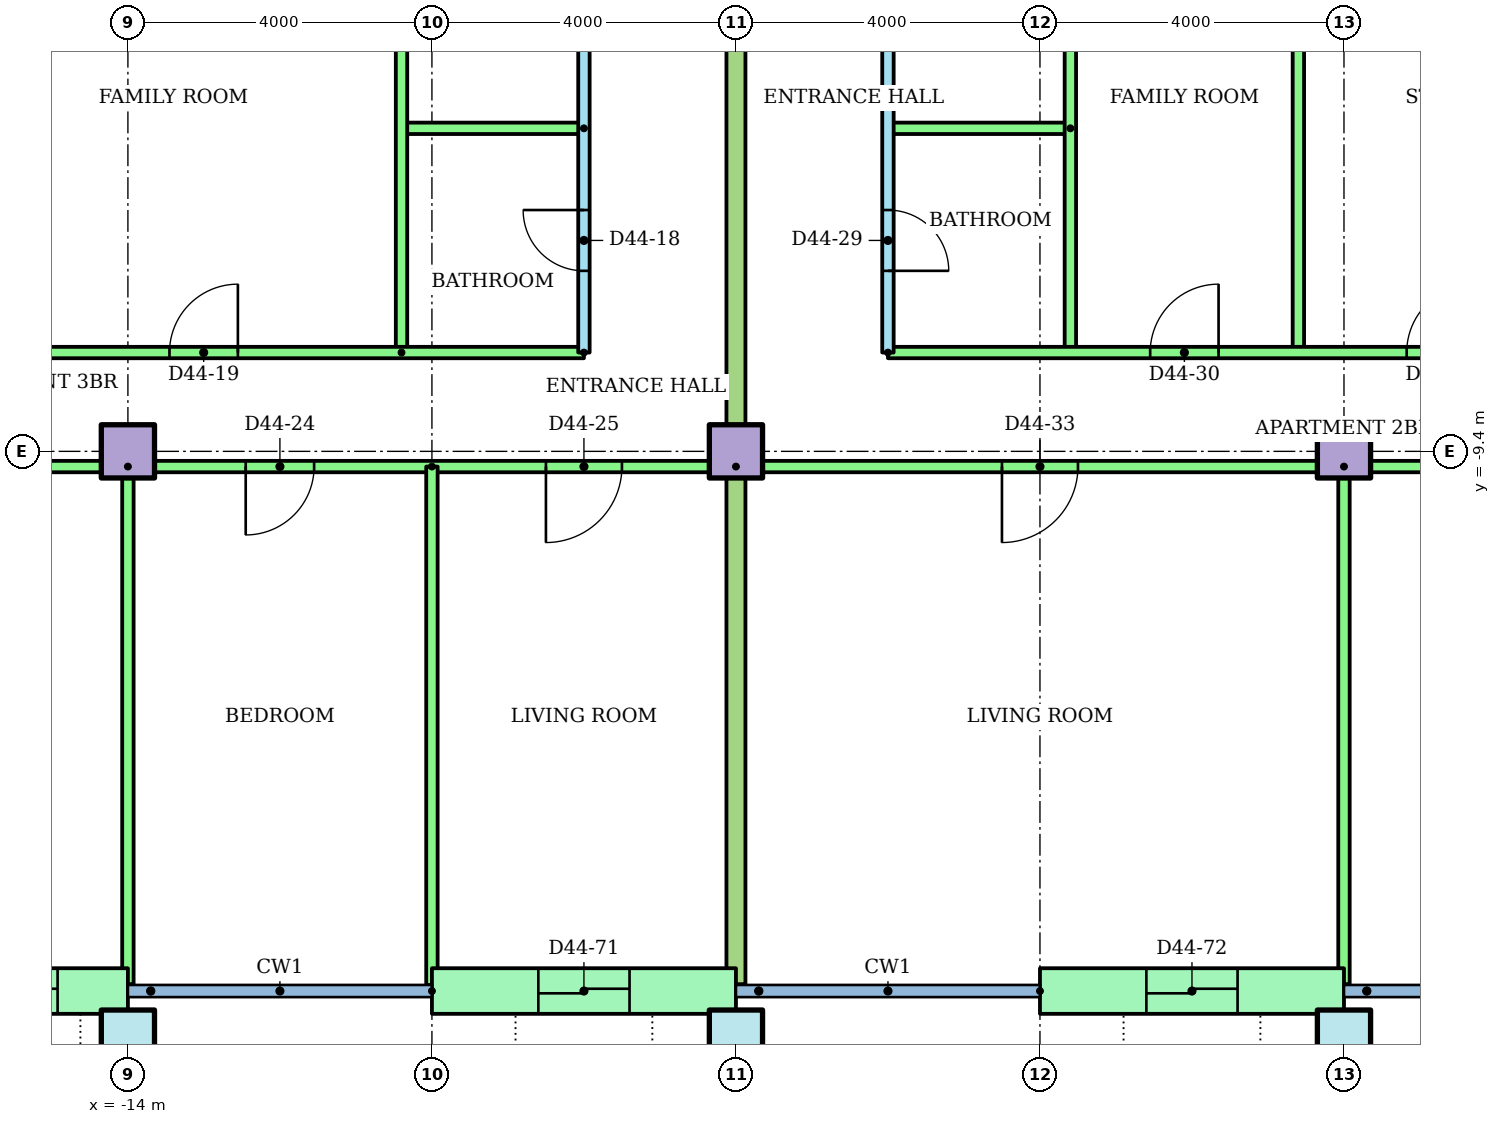
"""IFC4 building model, lengths in metres.
Left out: names, types, materials, properties, quantities, classifications, styles, units other than length and angle.
Written with IfcOpenShell. Run it as: python <this file> out.ifc"""

import sys

from ifc_helpers import new_model, si_unit, direction, frame, frame_2d, origin, origin_2d, place, context, subcontext, project, spatial, rectangle, hollow_rectangle, extrude, element, fill, save


model = new_model("IFC4")
c1 = context("Model", 3, precision=1e-05, world=origin(), true_north=direction((0.0, 1.0)))
c2 = subcontext(c1, "Body", "Model", "MODEL_VIEW")
j1 = project(units=[si_unit("LENGTHUNIT", "METRE"), si_unit("PLANEANGLEUNIT", "RADIAN")], contexts=[c1])
p1 = place(None, origin())
s1 = spatial("IfcSite", under=j1, at=p1, CompositionType="ELEMENT")
p2 = place(p1, origin())
s2 = spatial("IfcBuilding", under=s1, at=p2, CompositionType="ELEMENT")
p3 = place(p2, frame((0.0, 0.0, 171.7)))
s3 = spatial("IfcBuildingStorey", under=s2, at=p3, CompositionType="ELEMENT", Elevation=171.7)
for number, where in (
    (1, (-14.0, -17.1, 0.0)),
    (2, (-6.0, -17.1, 0.0)),
    (3, (2.0, -17.1, 0.0)),
):
    element("IfcColumn", number, at=place(p3, frame(where)), inside=s3, PredefinedType="COLUMN", context=c2, shape_type="SweptSolid", body=[
        extrude(hollow_rectangle(XDim=0.7, YDim=0.7, WallThickness=0.036, at=origin_2d()), origin(), (0.0, 0.0, 1.0), 3.2),
    ])
for number, where in (
    (4, (-14.0, -9.4, 0.0)),
    (5, (-6.0, -9.4, 0.0)),
    (6, (2.0, -9.4, 0.0)),
):
    element("IfcColumn", number, at=place(p3, frame(where)), inside=s3, PredefinedType="COLUMN", context=c2, shape_type="SweptSolid", body=[
        extrude(rectangle(XDim=0.7, YDim=0.7, at=origin_2d()), origin(), (0.0, 0.0, 1.0), 3.2),
    ])
p4 = place(p3, frame((-17.05, -16.5, 0.0)))
e7 = element("IfcWall", 7, at=p4, inside=s3, PredefinedType="STANDARD", context=c2, shape_type="SweptSolid", body=[
    extrude(rectangle(XDim=3.05, YDim=0.6, at=frame_2d((1.525, 0.0))), origin(), (0.0, 0.0, 1.0), 2.92),
])
p5 = place(p4, frame((0.925, 0.0, 0.0)))
e8 = element("IfcOpeningElement", 8, at=p5, cuts=e7, PredefinedType="OPENING", context=c2, shape_type="SweptSolid", body=[
    extrude(rectangle(XDim=1.2, YDim=2.1, at=frame_2d((0.6, 1.05))), frame((0.0, 0.31, 0.0), z_axis=(0.0, -1.0, 0.0), x_axis=(1.0, 0.0, 0.0)), (0.0, 0.0, 1.0), 0.62),
])
p6 = place(p3, frame((-10.0, -16.5, 0.0)))
e9 = element("IfcWall", 9, at=p6, inside=s3, PredefinedType="STANDARD", context=c2, shape_type="SweptSolid", body=[
    extrude(rectangle(XDim=4.0, YDim=0.6, at=frame_2d((2.0, 0.0))), origin(), (0.0, 0.0, 1.0), 2.92),
])
p7 = place(p6, frame((1.4, 0.0, 0.0)))
e10 = element("IfcOpeningElement", 10, at=p7, cuts=e9, PredefinedType="OPENING", context=c2, shape_type="SweptSolid", body=[
    extrude(rectangle(XDim=1.2, YDim=2.1, at=frame_2d((0.6, 1.05))), frame((0.0, 0.31, 0.0), z_axis=(0.0, -1.0, 0.0), x_axis=(1.0, 0.0, 0.0)), (0.0, 0.0, 1.0), 0.62),
])
p8 = place(p3, frame((-2.0, -16.5, 0.0)))
e11 = element("IfcWall", 11, at=p8, inside=s3, PredefinedType="STANDARD", context=c2, shape_type="SweptSolid", body=[
    extrude(rectangle(XDim=4.0, YDim=0.6, at=frame_2d((2.0, 0.0))), origin(), (0.0, 0.0, 1.0), 2.92),
])
p9 = place(p8, frame((1.4, 0.0, 0.0)))
e12 = element("IfcOpeningElement", 12, at=p9, cuts=e11, PredefinedType="OPENING", context=c2, shape_type="SweptSolid", body=[
    extrude(rectangle(XDim=1.2, YDim=2.1, at=frame_2d((0.6, 1.05))), frame((0.0, 0.31, 0.0), z_axis=(0.0, -1.0, 0.0), x_axis=(1.0, 0.0, 0.0)), (0.0, 0.0, 1.0), 0.62),
])
p10 = place(p3, frame((-8.0, -8.1, 0.0), z_axis=(0.0, 0.0, 1.0), x_axis=(0.0, 1.0, 0.0)))
e13 = element("IfcWall", 13, at=p10, inside=s3, PredefinedType="PARTITIONING", context=c2, shape_type="SweptSolid", body=[
    extrude(rectangle(XDim=6.7, YDim=0.15, at=frame_2d((3.35, 0.0))), origin(), (0.0, 0.0, 1.0), 2.4),
])
p11 = place(p10, frame((4.375, 0.0, 0.0)))
e14 = element("IfcOpeningElement", 14, at=p11, cuts=e13, PredefinedType="OPENING", context=c2, shape_type="SweptSolid", body=[
    extrude(rectangle(XDim=0.9, YDim=2.1, at=frame_2d((0.45, 1.05))), frame((0.0, 0.085, 0.0), z_axis=(0.0, -1.0, 0.0), x_axis=(1.0, 0.0, 0.0)), (0.0, 0.0, 1.0), 0.17),
])
p12 = place(p10, frame((1.075, 0.0, 0.0)))
e15 = element("IfcOpeningElement", 15, at=p12, cuts=e13, PredefinedType="OPENING", context=c2, shape_type="SweptSolid", body=[
    extrude(rectangle(XDim=0.8, YDim=2.1, at=frame_2d((0.4, 1.05))), frame((0.0, 0.085, 0.0), z_axis=(0.0, -1.0, 0.0), x_axis=(1.0, 0.0, 0.0)), (0.0, 0.0, 1.0), 0.17),
])
p13 = place(p3, frame((-8.0, -5.15, 0.0), z_axis=(0.0, 0.0, 1.0), x_axis=(-1.0, 0.0, 0.0)))
e16 = element("IfcWall", 16, at=p13, inside=s3, PredefinedType="PARTITIONING", context=c2, shape_type="SweptSolid", body=[
    extrude(rectangle(XDim=2.4, YDim=0.15, at=frame_2d((1.2, 0.0))), origin(), (0.0, 0.0, 1.0), 2.4),
])
p14 = place(p3, frame((-10.4, -8.1, 0.0), z_axis=(0.0, 0.0, 1.0), x_axis=(0.0, 1.0, 0.0)))
e17 = element("IfcWall", 17, at=p14, inside=s3, PredefinedType="PARTITIONING", context=c2, shape_type="SweptSolid", body=[
    extrude(rectangle(XDim=6.7, YDim=0.15, at=frame_2d((3.35, 0.0))), origin(), (0.0, 0.0, 1.0), 2.4),
])
p15 = place(p3, frame((-24.81, -8.1, 0.0)))
e18 = element("IfcWall", 18, at=p15, inside=s3, PredefinedType="PARTITIONING", context=c2, shape_type="SweptSolid", body=[
    extrude(rectangle(XDim=16.81, YDim=0.15, at=frame_2d((8.405, 0.0))), origin(), (0.0, 0.0, 1.0), 2.4),
])
p16 = place(p15, frame((11.357, 0.0, 0.0)))
e19 = element("IfcOpeningElement", 19, at=p16, cuts=e18, PredefinedType="OPENING", context=c2, shape_type="SweptSolid", body=[
    extrude(rectangle(XDim=0.9, YDim=2.1, at=frame_2d((0.45, 1.05))), frame((0.0, 0.085, 0.0), z_axis=(0.0, -1.0, 0.0), x_axis=(1.0, 0.0, 0.0)), (0.0, 0.0, 1.0), 0.17),
])
p17 = place(p15, frame((5.585, 0.0, 0.0)))
e20 = element("IfcOpeningElement", 20, at=p17, cuts=e18, PredefinedType="OPENING", context=c2, shape_type="SweptSolid", body=[
    extrude(rectangle(XDim=0.9, YDim=2.1, at=frame_2d((0.45, 1.05))), frame((0.0, 0.085, 0.0), z_axis=(0.0, -1.0, 0.0), x_axis=(1.0, 0.0, 0.0)), (0.0, 0.0, 1.0), 0.17),
])
p18 = place(p15, frame((1.363, 0.0, 0.0)))
e21 = element("IfcOpeningElement", 21, at=p18, cuts=e18, PredefinedType="OPENING", context=c2, shape_type="SweptSolid", body=[
    extrude(rectangle(XDim=0.9, YDim=2.1, at=frame_2d((0.45, 1.05))), frame((0.0, 0.085, 0.0), z_axis=(0.0, -1.0, 0.0), x_axis=(1.0, 0.0, 0.0)), (0.0, 0.0, 1.0), 0.17),
])
p19 = place(p3, frame((-6.0, -9.6, 0.0), z_axis=(0.0, 0.0, 1.0), x_axis=(-1.0, 0.0, 0.0)))
e22 = element("IfcWall", 22, at=p19, inside=s3, PredefinedType="PARTITIONING", context=c2, shape_type="SweptSolid", body=[
    extrude(rectangle(XDim=18.82, YDim=0.15, at=frame_2d((9.41, 0.0))), origin(), (0.0, 0.0, 1.0), 2.4),
])
p20 = place(p19, frame((16.547, 0.0, 0.0)))
e23 = element("IfcOpeningElement", 23, at=p20, cuts=e22, PredefinedType="OPENING", context=c2, shape_type="SweptSolid", body=[
    extrude(rectangle(XDim=0.9, YDim=2.1, at=frame_2d((0.45, 1.05))), frame((0.0, 0.085, 0.0), z_axis=(0.0, -1.0, 0.0), x_axis=(1.0, 0.0, 0.0)), (0.0, 0.0, 1.0), 0.17),
])
p21 = place(p19, frame((10.45, 0.0, 0.0)))
e24 = element("IfcOpeningElement", 24, at=p21, cuts=e22, PredefinedType="OPENING", context=c2, shape_type="SweptSolid", body=[
    extrude(rectangle(XDim=0.9, YDim=2.1, at=frame_2d((0.45, 1.05))), frame((0.0, 0.085, 0.0), z_axis=(0.0, -1.0, 0.0), x_axis=(1.0, 0.0, 0.0)), (0.0, 0.0, 1.0), 0.17),
])
p22 = place(p19, frame((5.55, 0.0, 0.0)))
e25 = element("IfcOpeningElement", 25, at=p22, cuts=e22, PredefinedType="OPENING", context=c2, shape_type="SweptSolid", body=[
    extrude(rectangle(XDim=0.9, YDim=2.1, at=frame_2d((0.45, 1.05))), frame((0.0, 0.085, 0.0), z_axis=(0.0, -1.0, 0.0), x_axis=(1.0, 0.0, 0.0)), (0.0, 0.0, 1.0), 0.17),
])
p23 = place(p19, frame((1.5, 0.0, 0.0)))
e26 = element("IfcOpeningElement", 26, at=p23, cuts=e22, PredefinedType="OPENING", context=c2, shape_type="SweptSolid", body=[
    extrude(rectangle(XDim=1.0, YDim=2.1, at=frame_2d((0.5, 1.05))), frame((0.0, 0.085, 0.0), z_axis=(0.0, -1.0, 0.0), x_axis=(1.0, 0.0, 0.0)), (0.0, 0.0, 1.0), 0.17),
])
p24 = place(p3, frame((-14.0, -9.6, 0.0), z_axis=(0.0, 0.0, 1.0), x_axis=(0.0, -1.0, 0.0)))
e27 = element("IfcWall", 27, at=p24, inside=s3, PredefinedType="PARTITIONING", context=c2, shape_type="SweptSolid", body=[
    extrude(rectangle(XDim=6.81, YDim=0.15, at=frame_2d((3.405, 0.0))), origin(), (0.0, 0.0, 1.0), 2.4),
])
p25 = place(p3, frame((-10.0, -9.6, 0.0), z_axis=(0.0, 0.0, 1.0), x_axis=(0.0, -1.0, 0.0)))
e28 = element("IfcWall", 28, at=p25, inside=s3, PredefinedType="PARTITIONING", context=c2, shape_type="SweptSolid", body=[
    extrude(rectangle(XDim=6.821, YDim=0.15, at=frame_2d((3.41, 0.0))), origin(), (0.0, 0.0, 1.0), 2.4),
])
p26 = place(p3, frame((-4.0, -1.4, 0.0), z_axis=(0.0, 0.0, 1.0), x_axis=(0.0, -1.0, 0.0)))
e29 = element("IfcWall", 29, at=p26, inside=s3, PredefinedType="PARTITIONING", context=c2, shape_type="SweptSolid", body=[
    extrude(rectangle(XDim=6.7, YDim=0.15, at=frame_2d((3.35, 0.0))), origin(), (0.0, 0.0, 1.0), 2.4),
])
p27 = place(p26, frame((1.425, 0.0, 0.0)))
e30 = element("IfcOpeningElement", 30, at=p27, cuts=e29, PredefinedType="OPENING", context=c2, shape_type="SweptSolid", body=[
    extrude(rectangle(XDim=0.9, YDim=2.1, at=frame_2d((0.45, 1.05))), frame((0.0, 0.085, 0.0), z_axis=(0.0, -1.0, 0.0), x_axis=(1.0, 0.0, 0.0)), (0.0, 0.0, 1.0), 0.17),
])
p28 = place(p26, frame((4.825, 0.0, 0.0)))
e31 = element("IfcOpeningElement", 31, at=p28, cuts=e29, PredefinedType="OPENING", context=c2, shape_type="SweptSolid", body=[
    extrude(rectangle(XDim=0.8, YDim=2.1, at=frame_2d((0.4, 1.05))), frame((0.0, 0.085, 0.0), z_axis=(0.0, -1.0, 0.0), x_axis=(1.0, 0.0, 0.0)), (0.0, 0.0, 1.0), 0.17),
])
p29 = place(p3, frame((-1.6, -5.15, 0.0), z_axis=(0.0, 0.0, 1.0), x_axis=(-1.0, 0.0, 0.0)))
e32 = element("IfcWall", 32, at=p29, inside=s3, PredefinedType="PARTITIONING", context=c2, shape_type="SweptSolid", body=[
    extrude(rectangle(XDim=2.4, YDim=0.15, at=frame_2d((1.2, 0.0))), origin(), (0.0, 0.0, 1.0), 2.4),
])
for number, where, z_axis, x_axis in (
    (33, (-1.6, -1.4, 0.0), (0.0, 0.0, 1.0), (0.0, -1.0, 0.0)),
    (34, (1.4, -1.4, 0.0), (0.0, 0.0, 1.0), (0.0, -1.0, 0.0)),
):
    element("IfcWall", number, at=place(p3, frame(where, z_axis=z_axis, x_axis=x_axis)), inside=s3, PredefinedType="PARTITIONING", context=c2, shape_type="SweptSolid", body=[
        extrude(rectangle(XDim=6.7, YDim=0.15, at=frame_2d((3.35, 0.0))), origin(), (0.0, 0.0, 1.0), 2.4),
    ])
p30 = place(p3, frame((-4.0, -8.1, 0.0)))
e35 = element("IfcWall", 35, at=p30, inside=s3, PredefinedType="PARTITIONING", context=c2, shape_type="SweptSolid", body=[
    extrude(rectangle(XDim=14.0, YDim=0.15, at=frame_2d((7.0, 0.0))), origin(), (0.0, 0.0, 1.0), 2.4),
])
p31 = place(p30, frame((3.45, 0.0, 0.0)))
e36 = element("IfcOpeningElement", 36, at=p31, cuts=e35, PredefinedType="OPENING", context=c2, shape_type="SweptSolid", body=[
    extrude(rectangle(XDim=0.9, YDim=2.1, at=frame_2d((0.45, 1.05))), frame((0.0, 0.085, 0.0), z_axis=(0.0, -1.0, 0.0), x_axis=(1.0, 0.0, 0.0)), (0.0, 0.0, 1.0), 0.17),
])
p32 = place(p30, frame((6.825, 0.0, 0.0)))
e37 = element("IfcOpeningElement", 37, at=p32, cuts=e35, PredefinedType="OPENING", context=c2, shape_type="SweptSolid", body=[
    extrude(rectangle(XDim=0.9, YDim=2.1, at=frame_2d((0.45, 1.05))), frame((0.0, 0.085, 0.0), z_axis=(0.0, -1.0, 0.0), x_axis=(1.0, 0.0, 0.0)), (0.0, 0.0, 1.0), 0.17),
])
p33 = place(p30, frame((11.125, 0.0, 0.0)))
e38 = element("IfcOpeningElement", 38, at=p33, cuts=e35, PredefinedType="OPENING", context=c2, shape_type="SweptSolid", body=[
    extrude(rectangle(XDim=0.9, YDim=2.1, at=frame_2d((0.45, 1.05))), frame((0.0, 0.085, 0.0), z_axis=(0.0, -1.0, 0.0), x_axis=(1.0, 0.0, 0.0)), (0.0, 0.0, 1.0), 0.17),
])
p34 = place(p3, frame((10.0, -9.6, 0.0), z_axis=(0.0, 0.0, 1.0), x_axis=(-1.0, 0.0, 0.0)))
e39 = element("IfcWall", 39, at=p34, inside=s3, PredefinedType="PARTITIONING", context=c2, shape_type="SweptSolid", body=[
    extrude(rectangle(XDim=16.0, YDim=0.15, at=frame_2d((8.0, 0.0))), origin(), (0.0, 0.0, 1.0), 2.4),
])
p35 = place(p34, frame((11.5, 0.0, 0.0)))
e40 = element("IfcOpeningElement", 40, at=p35, cuts=e39, PredefinedType="OPENING", context=c2, shape_type="SweptSolid", body=[
    extrude(rectangle(XDim=1.0, YDim=2.1, at=frame_2d((0.5, 1.05))), frame((0.0, 0.085, 0.0), z_axis=(0.0, -1.0, 0.0), x_axis=(1.0, 0.0, 0.0)), (0.0, 0.0, 1.0), 0.17),
])
p36 = place(p34, frame((5.55, 0.0, 0.0)))
e41 = element("IfcOpeningElement", 41, at=p36, cuts=e39, PredefinedType="OPENING", context=c2, shape_type="SweptSolid", body=[
    extrude(rectangle(XDim=0.9, YDim=2.1, at=frame_2d((0.45, 1.05))), frame((0.0, 0.085, 0.0), z_axis=(0.0, -1.0, 0.0), x_axis=(1.0, 0.0, 0.0)), (0.0, 0.0, 1.0), 0.17),
])
p37 = place(p34, frame((1.55, 0.0, 0.0)))
e42 = element("IfcOpeningElement", 42, at=p37, cuts=e39, PredefinedType="OPENING", context=c2, shape_type="SweptSolid", body=[
    extrude(rectangle(XDim=0.9, YDim=2.1, at=frame_2d((0.45, 1.05))), frame((0.0, 0.085, 0.0), z_axis=(0.0, -1.0, 0.0), x_axis=(1.0, 0.0, 0.0)), (0.0, 0.0, 1.0), 0.17),
])
p38 = place(p3, frame((2.0, -9.6, 0.0), z_axis=(0.0, 0.0, 1.0), x_axis=(0.0, -1.0, 0.0)))
e43 = element("IfcWall", 43, at=p38, inside=s3, PredefinedType="PARTITIONING", context=c2, shape_type="SweptSolid", body=[
    extrude(rectangle(XDim=6.81, YDim=0.15, at=frame_2d((3.405, 0.0))), origin(), (0.0, 0.0, 1.0), 2.4),
])
p39 = place(p3, frame((-6.0, -1.4, 0.0), z_axis=(0.0, 0.0, 1.0), x_axis=(0.0, -1.0, 0.0)))
e44 = element("IfcWall", 44, at=p39, inside=s3, PredefinedType="PARTITIONING", context=c2, shape_type="SweptSolid", body=[
    extrude(rectangle(XDim=15.01, YDim=0.25, at=frame_2d((7.505, 0.0))), origin(), (0.0, 0.0, 1.0), 2.4),
])
p40 = place(p12, origin())
e45 = element("IfcDoor", 45, at=p40, inside=s3, OperationType="SINGLE_SWING_RIGHT", PredefinedType="DOOR", context=c2, shape_type="SweptSolid", body=[
    extrude(rectangle(XDim=0.8, YDim=2.1, at=frame_2d((0.4, 1.05))), frame((0.0, 0.025, 0.0), z_axis=(0.0, -1.0, 0.0), x_axis=(1.0, 0.0, 0.0)), (0.0, 0.0, 1.0), 0.05),
])
fill(e15, e45)
p41 = place(p16, origin())
e46 = element("IfcDoor", 46, at=p41, inside=s3, OperationType="SINGLE_SWING_RIGHT", PredefinedType="DOOR", context=c2, shape_type="SweptSolid", body=[
    extrude(rectangle(XDim=0.9, YDim=2.1, at=frame_2d((0.45, 1.05))), frame((0.0, 0.025, 0.0), z_axis=(0.0, -1.0, 0.0), x_axis=(1.0, 0.0, 0.0)), (0.0, 0.0, 1.0), 0.05),
])
fill(e19, e46)
p42 = place(p22, origin())
e47 = element("IfcDoor", 47, at=p42, inside=s3, OperationType="SINGLE_SWING_RIGHT", PredefinedType="DOOR", context=c2, shape_type="SweptSolid", body=[
    extrude(rectangle(XDim=0.9, YDim=2.1, at=frame_2d((0.45, 1.05))), frame((0.0, 0.025, 0.0), z_axis=(0.0, -1.0, 0.0), x_axis=(1.0, 0.0, 0.0)), (0.0, 0.0, 1.0), 0.05),
])
fill(e25, e47)
p43 = place(p23, origin())
e48 = element("IfcDoor", 48, at=p43, inside=s3, OperationType="SINGLE_SWING_RIGHT", PredefinedType="DOOR", context=c2, shape_type="SweptSolid", body=[
    extrude(rectangle(XDim=1.0, YDim=2.1, at=frame_2d((0.5, 1.05))), frame((0.0, 0.025, 0.0), z_axis=(0.0, -1.0, 0.0), x_axis=(1.0, 0.0, 0.0)), (0.0, 0.0, 1.0), 0.05),
])
fill(e26, e48)
p44 = place(p28, origin())
e49 = element("IfcDoor", 49, at=p44, inside=s3, OperationType="SINGLE_SWING_RIGHT", PredefinedType="DOOR", context=c2, shape_type="SweptSolid", body=[
    extrude(rectangle(XDim=0.8, YDim=2.1, at=frame_2d((0.4, 1.05))), frame((0.0, 0.025, 0.0), z_axis=(0.0, -1.0, 0.0), x_axis=(1.0, 0.0, 0.0)), (0.0, 0.0, 1.0), 0.05),
])
fill(e31, e49)
p45 = place(p31, origin())
e50 = element("IfcDoor", 50, at=p45, inside=s3, OperationType="SINGLE_SWING_RIGHT", PredefinedType="DOOR", context=c2, shape_type="SweptSolid", body=[
    extrude(rectangle(XDim=0.9, YDim=2.1, at=frame_2d((0.45, 1.05))), frame((0.0, 0.025, 0.0), z_axis=(0.0, -1.0, 0.0), x_axis=(1.0, 0.0, 0.0)), (0.0, 0.0, 1.0), 0.05),
])
fill(e36, e50)
p46 = place(p32, origin())
e51 = element("IfcDoor", 51, at=p46, inside=s3, OperationType="SINGLE_SWING_RIGHT", PredefinedType="DOOR", context=c2, shape_type="SweptSolid", body=[
    extrude(rectangle(XDim=0.9, YDim=2.1, at=frame_2d((0.45, 1.05))), frame((0.0, 0.025, 0.0), z_axis=(0.0, -1.0, 0.0), x_axis=(1.0, 0.0, 0.0)), (0.0, 0.0, 1.0), 0.05),
])
fill(e37, e51)
p47 = place(p35, origin())
e52 = element("IfcDoor", 52, at=p47, inside=s3, OperationType="SINGLE_SWING_RIGHT", PredefinedType="DOOR", context=c2, shape_type="SweptSolid", body=[
    extrude(rectangle(XDim=1.0, YDim=2.1, at=frame_2d((0.5, 1.05))), frame((0.0, 0.025, 0.0), z_axis=(0.0, -1.0, 0.0), x_axis=(1.0, 0.0, 0.0)), (0.0, 0.0, 1.0), 0.05),
])
fill(e40, e52)
p48 = place(p5, origin())
e53 = element("IfcDoor", 53, at=p48, inside=s3, OperationType="SLIDING_TO_LEFT", PredefinedType="DOOR", context=c2, shape_type="SweptSolid", body=[
    extrude(rectangle(XDim=1.2, YDim=2.1, at=frame_2d((0.6, 1.05))), frame((0.0, 0.025, 0.0), z_axis=(0.0, -1.0, 0.0), x_axis=(1.0, 0.0, 0.0)), (0.0, 0.0, 1.0), 0.05),
])
fill(e8, e53)
p49 = place(p7, origin())
e54 = element("IfcDoor", 54, at=p49, inside=s3, OperationType="SLIDING_TO_LEFT", PredefinedType="DOOR", context=c2, shape_type="SweptSolid", body=[
    extrude(rectangle(XDim=1.2, YDim=2.1, at=frame_2d((0.6, 1.05))), frame((0.0, 0.025, 0.0), z_axis=(0.0, -1.0, 0.0), x_axis=(1.0, 0.0, 0.0)), (0.0, 0.0, 1.0), 0.05),
])
fill(e10, e54)
p50 = place(p9, origin())
e55 = element("IfcDoor", 55, at=p50, inside=s3, OperationType="SLIDING_TO_LEFT", PredefinedType="DOOR", context=c2, shape_type="SweptSolid", body=[
    extrude(rectangle(XDim=1.2, YDim=2.1, at=frame_2d((0.6, 1.05))), frame((0.0, 0.025, 0.0), z_axis=(0.0, -1.0, 0.0), x_axis=(1.0, 0.0, 0.0)), (0.0, 0.0, 1.0), 0.05),
])
fill(e12, e55)
save(model, sys.argv[1])
